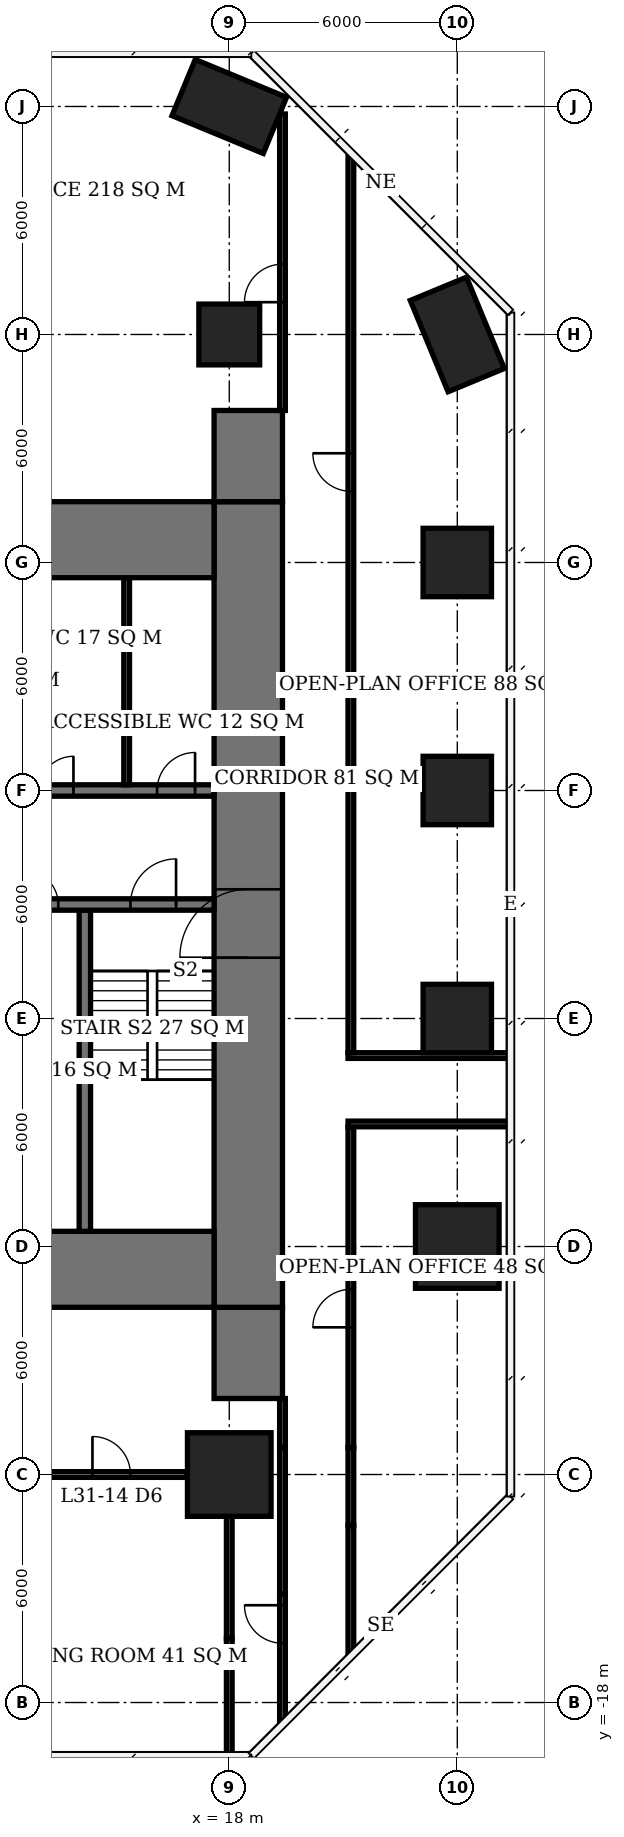
"""IFC4 building model, lengths in metres.
Left out: names, types, materials, properties, quantities, classifications, styles, units other than length and angle.
Written with IfcOpenShell. Run it as: python <this file> out.ifc"""

import sys

from ifc_helpers import new_model, si_unit, direction, frame, frame_2d, origin, origin_2d, place, context, subcontext, project, spatial, rectangle, extrude, element, fill, save


model = new_model("IFC4")
c1 = context("Model", 3, precision=1e-05, world=origin(), true_north=direction((0.0, 1.0)))
c2 = subcontext(c1, "Body", "Model", "MODEL_VIEW")
j1 = project(units=[si_unit("LENGTHUNIT", "METRE"), si_unit("PLANEANGLEUNIT", "RADIAN")], contexts=[c1])
p1 = place(None, origin())
s1 = spatial("IfcSite", under=j1, at=p1, CompositionType="ELEMENT")
p2 = place(p1, origin())
s2 = spatial("IfcBuilding", under=s1, at=p2, CompositionType="ELEMENT")
p3 = place(p2, frame((0.0, 0.0, 128.9)))
s3 = spatial("IfcBuildingStorey", under=s2, at=p3, CompositionType="ELEMENT", Elevation=128.9)
p4 = place(p3, frame((18.0, -12.0, 0.0), z_axis=(0.0, 0.0, 1.0), x_axis=(1.0, 0.0, 0.0)))
e1 = element("IfcColumn", 1, at=p4, inside=s3, PredefinedType="COLUMN", context=c2, shape_type="SweptSolid", body=[
    extrude(rectangle(XDim=2.2, YDim=2.2, at=origin_2d()), origin(), (0.0, 0.0, 1.0), 3.9),
])
p5 = place(p3, frame((18.0, 18.0, 0.0), z_axis=(0.0, 0.0, 1.0), x_axis=(1.0, 0.0, 0.0)))
e2 = element("IfcColumn", 2, at=p5, inside=s3, PredefinedType="COLUMN", context=c2, shape_type="SweptSolid", body=[
    extrude(rectangle(XDim=1.6, YDim=1.6, at=origin_2d()), origin(), (0.0, 0.0, 1.0), 3.9),
])
p6 = place(p3, frame((18.0, 24.0, 0.0), z_axis=(0.0, 0.0, 1.0), x_axis=(0.923879532511, -0.382683432365, 0.0)))
e3 = element("IfcColumn", 3, at=p6, inside=s3, PredefinedType="COLUMN", context=c2, shape_type="SweptSolid", body=[
    extrude(rectangle(XDim=2.6, YDim=1.6, at=origin_2d()), origin(), (0.0, 0.0, 1.0), 3.9),
])
p7 = place(p3, frame((24.0, -6.0, 0.0), z_axis=(0.0, 0.0, 1.0), x_axis=(1.0, 0.0, 0.0)))
e4 = element("IfcColumn", 4, at=p7, inside=s3, PredefinedType="COLUMN", context=c2, shape_type="SweptSolid", body=[
    extrude(rectangle(XDim=2.2, YDim=2.2, at=origin_2d()), origin(), (0.0, 0.0, 1.0), 3.9),
])
for number, where, z_axis, x_axis in (
    (5, (24.0, 0.0, 0.0), (0.0, 0.0, 1.0), (1.0, 0.0, 0.0)),
    (6, (24.0, 6.0, 0.0), (0.0, 0.0, 1.0), (1.0, 0.0, 0.0)),
    (7, (24.0, 12.0, 0.0), (0.0, 0.0, 1.0), (1.0, 0.0, 0.0)),
):
    element("IfcColumn", number, at=place(p3, frame(where, z_axis=z_axis, x_axis=x_axis)), inside=s3, PredefinedType="COLUMN", context=c2, shape_type="SweptSolid", body=[
        extrude(rectangle(XDim=1.8, YDim=1.8, at=origin_2d()), origin(), (0.0, 0.0, 1.0), 3.9),
    ])
p8 = place(p3, frame((24.0, 18.0, 0.0), z_axis=(0.0, 0.0, 1.0), x_axis=(0.382683432365, -0.923879532511, 0.0)))
e8 = element("IfcColumn", 8, at=p8, inside=s3, PredefinedType="COLUMN", context=c2, shape_type="SweptSolid", body=[
    extrude(rectangle(XDim=2.6, YDim=1.6, at=origin_2d()), origin(), (0.0, 0.0, 1.0), 3.9),
])
for number, where, z_axis, x_axis in (
    (9, (-5.6, -6.6, 0.0), (0.0, 0.0, 1.0), (1.0, 0.0, 0.0)),
    (10, (-5.6, 12.6, 0.0), (0.0, 0.0, 1.0), (1.0, 0.0, 0.0)),
):
    element("IfcWall", number, at=place(p3, frame(where, z_axis=z_axis, x_axis=x_axis)), inside=s3, PredefinedType="SHEAR", context=c2, shape_type="SweptSolid", body=[
        extrude(rectangle(XDim=23.2, YDim=2.0, at=frame_2d((11.6, 0.0))), origin(), (0.0, 0.0, 1.0), 3.9),
    ])
p9 = place(p3, frame((18.5, -7.6, 0.0), z_axis=(0.0, 0.0, 1.0), x_axis=(0.0, 1.0, 0.0)))
e11 = element("IfcWall", 11, at=p9, inside=s3, PredefinedType="SHEAR", context=c2, shape_type="SweptSolid", body=[
    extrude(rectangle(XDim=21.2, YDim=1.8, at=frame_2d((10.6, 0.0))), origin(), (0.0, 0.0, 1.0), 3.9),
])
p10 = place(p9, frame((9.2, 0.0, 0.0)))
e12 = element("IfcOpeningElement", 12, at=p10, cuts=e11, PredefinedType="OPENING", context=c2, shape_type="SweptSolid", body=[
    extrude(rectangle(XDim=1.8, YDim=2.4, at=frame_2d((0.9, 1.2))), frame((0.0, 0.91, 0.0), z_axis=(0.0, -1.0, 0.0), x_axis=(1.0, 0.0, 0.0)), (0.0, 0.0, 1.0), 1.82),
])
for number, where, z_axis, x_axis in (
    (13, (18.5, -10.0, 0.0), (0.0, 0.0, 1.0), (0.0, 1.0, 0.0)),
    (14, (18.5, 13.6, 0.0), (0.0, 0.0, 1.0), (0.0, 1.0, 0.0)),
):
    element("IfcWall", number, at=place(p3, frame(where, z_axis=z_axis, x_axis=x_axis)), inside=s3, PredefinedType="SHEAR", context=c2, shape_type="SweptSolid", body=[
        extrude(rectangle(XDim=2.4, YDim=1.8, at=frame_2d((1.2, 0.0))), origin(), (0.0, 0.0, 1.0), 3.9),
    ])
p11 = place(p3, frame((12.15, 3.0, 0.0), z_axis=(0.0, 0.0, 1.0), x_axis=(1.0, 0.0, 0.0)))
e15 = element("IfcWall", 15, at=p11, inside=s3, PredefinedType="SHEAR", context=c2, shape_type="SweptSolid", body=[
    extrude(rectangle(XDim=5.45, YDim=0.3, at=frame_2d((2.725, 0.0))), origin(), (0.0, 0.0, 1.0), 3.9),
])
p12 = place(p11, frame((3.25, 0.0, 0.0)))
e16 = element("IfcOpeningElement", 16, at=p12, cuts=e15, PredefinedType="OPENING", context=c2, shape_type="SweptSolid", body=[
    extrude(rectangle(XDim=1.2, YDim=2.1, at=frame_2d((0.6, 1.05))), frame((0.0, 0.16, 0.0), z_axis=(0.0, -1.0, 0.0), x_axis=(1.0, 0.0, 0.0)), (0.0, 0.0, 1.0), 0.32),
])
p13 = place(p11, frame((0.45, 0.0, 0.0)))
e17 = element("IfcOpeningElement", 17, at=p13, cuts=e15, PredefinedType="OPENING", context=c2, shape_type="SweptSolid", body=[
    extrude(rectangle(XDim=0.9, YDim=2.1, at=frame_2d((0.45, 1.05))), frame((0.0, 0.16, 0.0), z_axis=(0.0, -1.0, 0.0), x_axis=(1.0, 0.0, 0.0)), (0.0, 0.0, 1.0), 0.32),
])
p14 = place(p3, frame((-0.15, 6.0, 0.0), z_axis=(0.0, 0.0, 1.0), x_axis=(1.0, 0.0, 0.0)))
e18 = element("IfcWall", 18, at=p14, inside=s3, PredefinedType="SHEAR", context=c2, shape_type="SweptSolid", body=[
    extrude(rectangle(XDim=17.75, YDim=0.3, at=frame_2d((8.875, 0.0))), origin(), (0.0, 0.0, 1.0), 3.9),
])
p15 = place(p14, frame((13.15, 0.0, 0.0)))
e19 = element("IfcOpeningElement", 19, at=p15, cuts=e18, PredefinedType="OPENING", context=c2, shape_type="SweptSolid", body=[
    extrude(rectangle(XDim=0.9, YDim=2.1, at=frame_2d((0.45, 1.05))), frame((0.0, 0.16, 0.0), z_axis=(0.0, -1.0, 0.0), x_axis=(1.0, 0.0, 0.0)), (0.0, 0.0, 1.0), 0.32),
])
p16 = place(p14, frame((16.25, 0.0, 0.0)))
e20 = element("IfcOpeningElement", 20, at=p16, cuts=e18, PredefinedType="OPENING", context=c2, shape_type="SweptSolid", body=[
    extrude(rectangle(XDim=1.0, YDim=2.1, at=frame_2d((0.5, 1.05))), frame((0.0, 0.16, 0.0), z_axis=(0.0, -1.0, 0.0), x_axis=(1.0, 0.0, 0.0)), (0.0, 0.0, 1.0), 0.32),
])
p17 = place(p14, frame((7.25, 0.0, 0.0)))
e21 = element("IfcOpeningElement", 21, at=p17, cuts=e18, PredefinedType="OPENING", context=c2, shape_type="SweptSolid", body=[
    extrude(rectangle(XDim=1.0, YDim=2.1, at=frame_2d((0.5, 1.05))), frame((0.0, 0.16, 0.0), z_axis=(0.0, -1.0, 0.0), x_axis=(1.0, 0.0, 0.0)), (0.0, 0.0, 1.0), 0.32),
])
p18 = place(p14, frame((1.1, 0.0, 0.0)))
e22 = element("IfcOpeningElement", 22, at=p18, cuts=e18, PredefinedType="OPENING", context=c2, shape_type="SweptSolid", body=[
    extrude(rectangle(XDim=1.1, YDim=2.1, at=frame_2d((0.55, 1.05))), frame((0.0, 0.16, 0.0), z_axis=(0.0, -1.0, 0.0), x_axis=(1.0, 0.0, 0.0)), (0.0, 0.0, 1.0), 0.32),
])
p19 = place(p14, frame((4.1, 0.0, 0.0)))
e23 = element("IfcOpeningElement", 23, at=p19, cuts=e18, PredefinedType="OPENING", context=c2, shape_type="SweptSolid", body=[
    extrude(rectangle(XDim=1.1, YDim=2.1, at=frame_2d((0.55, 1.05))), frame((0.0, 0.16, 0.0), z_axis=(0.0, -1.0, 0.0), x_axis=(1.0, 0.0, 0.0)), (0.0, 0.0, 1.0), 0.32),
])
p20 = place(p3, frame((14.2, -5.6, 0.0), z_axis=(0.0, 0.0, 1.0), x_axis=(0.0, 1.0, 0.0)))
e24 = element("IfcWall", 24, at=p20, inside=s3, PredefinedType="SHEAR", context=c2, shape_type="SweptSolid", body=[
    extrude(rectangle(XDim=8.45, YDim=0.3, at=frame_2d((4.225, 0.0))), origin(), (0.0, 0.0, 1.0), 3.9),
])
p21 = place(p3, frame((15.3, 6.15, 0.0), z_axis=(0.0, 0.0, 1.0), x_axis=(0.0, 1.0, 0.0)))
e25 = element("IfcWall", 25, at=p21, inside=s3, PredefinedType="PLUMBINGWALL", context=c2, shape_type="SweptSolid", body=[
    extrude(rectangle(XDim=5.45, YDim=0.15, at=frame_2d((2.725, 0.0))), origin(), (0.0, 0.0, 1.0), 3.65),
])
p22 = place(p3, frame((12.9, -12.0, 0.0), z_axis=(0.0, 0.0, 1.0), x_axis=(1.0, 0.0, 0.0)))
e26 = element("IfcWall", 26, at=p22, inside=s3, PredefinedType="PARTITIONING", context=c2, shape_type="SweptSolid", body=[
    extrude(rectangle(XDim=4.0, YDim=0.15, at=frame_2d((2.0, 0.0))), origin(), (0.0, 0.0, 1.0), 3.65),
])
p23 = place(p22, frame((1.5, 0.0, 0.0)))
e27 = element("IfcOpeningElement", 27, at=p23, cuts=e26, PredefinedType="OPENING", context=c2, shape_type="SweptSolid", body=[
    extrude(rectangle(XDim=1.0, YDim=2.1, at=frame_2d((0.5, 1.05))), frame((0.0, 0.085, 0.0), z_axis=(0.0, -1.0, 0.0), x_axis=(1.0, 0.0, 0.0)), (0.0, 0.0, 1.0), 0.17),
])
p24 = place(p3, frame((18.0, -19.4, 0.0), z_axis=(0.0, 0.0, 1.0), x_axis=(0.0, 1.0, 0.0)))
e28 = element("IfcWall", 28, at=p24, inside=s3, PredefinedType="PARTITIONING", context=c2, shape_type="SweptSolid", body=[
    extrude(rectangle(XDim=3.09, YDim=0.15, at=frame_2d((1.545, 0.0))), origin(), (0.0, 0.0, 1.0), 3.65),
])
p25 = place(p3, frame((18.0, -16.31, 0.0), z_axis=(0.0, 0.0, 1.0), x_axis=(0.0, 1.0, 0.0)))
e29 = element("IfcWall", 29, at=p25, inside=s3, PredefinedType="PARTITIONING", context=c2, shape_type="SweptSolid", body=[
    extrude(rectangle(XDim=3.21, YDim=0.15, at=frame_2d((1.605, 0.0))), origin(), (0.0, 0.0, 1.0), 2.65),
])
p26 = place(p3, frame((19.4, -18.489, 0.0), z_axis=(0.0, 0.0, 1.0), x_axis=(0.0, 1.0, 0.0)))
e30 = element("IfcWall", 30, at=p26, inside=s3, PredefinedType="PARTITIONING", context=c2, shape_type="SweptSolid", body=[
    extrude(rectangle(XDim=3.349, YDim=0.15, at=frame_2d((1.675, 0.0))), origin(), (0.0, 0.0, 1.0), 3.65),
])
p27 = place(p26, frame((2.049, 0.0, 0.0)))
e31 = element("IfcOpeningElement", 31, at=p27, cuts=e30, PredefinedType="OPENING", context=c2, shape_type="SweptSolid", body=[
    extrude(rectangle(XDim=1.0, YDim=2.1, at=frame_2d((0.5, 1.05))), frame((0.0, 0.085, 0.0), z_axis=(0.0, -1.0, 0.0), x_axis=(1.0, 0.0, 0.0)), (0.0, 0.0, 1.0), 0.17),
])
p28 = place(p3, frame((19.4, -15.14, 0.0), z_axis=(0.0, 0.0, 1.0), x_axis=(0.0, 1.0, 0.0)))
e32 = element("IfcWall", 32, at=p28, inside=s3, PredefinedType="PARTITIONING", context=c2, shape_type="SweptSolid", body=[
    extrude(rectangle(XDim=3.85, YDim=0.15, at=frame_2d((1.925, 0.0))), origin(), (0.0, 0.0, 1.0), 2.65),
])
p29 = place(p3, frame((19.4, -11.29, 0.0), z_axis=(0.0, 0.0, 1.0), x_axis=(0.0, 1.0, 0.0)))
e33 = element("IfcWall", 33, at=p29, inside=s3, PredefinedType="PARTITIONING", context=c2, shape_type="SweptSolid", body=[
    extrude(rectangle(XDim=1.29, YDim=0.15, at=frame_2d((0.645, 0.0))), origin(), (0.0, 0.0, 1.0), 3.65),
])
p30 = place(p3, frame((19.4, 16.0, 0.0), z_axis=(0.0, 0.0, 1.0), x_axis=(0.0, 1.0, 0.0)))
e34 = element("IfcWall", 34, at=p30, inside=s3, PredefinedType="PARTITIONING", context=c2, shape_type="SweptSolid", body=[
    extrude(rectangle(XDim=7.802, YDim=0.15, at=frame_2d((3.901, 0.0))), origin(), (0.0, 0.0, 1.0), 3.65),
])
p31 = place(p30, frame((2.85, 0.0, 0.0)))
e35 = element("IfcOpeningElement", 35, at=p31, cuts=e34, PredefinedType="OPENING", context=c2, shape_type="SweptSolid", body=[
    extrude(rectangle(XDim=1.0, YDim=2.1, at=frame_2d((0.5, 1.05))), frame((0.0, 0.085, 0.0), z_axis=(0.0, -1.0, 0.0), x_axis=(1.0, 0.0, 0.0)), (0.0, 0.0, 1.0), 0.17),
])
p32 = place(p3, frame((21.2, -16.689, 0.0), z_axis=(0.0, 0.0, 1.0), x_axis=(0.0, 1.0, 0.0)))
e36 = element("IfcWall", 36, at=p32, inside=s3, PredefinedType="PARTITIONING", context=c2, shape_type="SweptSolid", body=[
    extrude(rectangle(XDim=3.349, YDim=0.15, at=frame_2d((1.674, 0.0))), origin(), (0.0, 0.0, 1.0), 3.65),
])
p33 = place(p3, frame((21.2, -13.34, 0.0), z_axis=(0.0, 0.0, 1.0), x_axis=(0.0, 1.0, 0.0)))
e37 = element("IfcWall", 37, at=p33, inside=s3, PredefinedType="PARTITIONING", context=c2, shape_type="SweptSolid", body=[
    extrude(rectangle(XDim=2.05, YDim=0.15, at=frame_2d((1.025, 0.0))), origin(), (0.0, 0.0, 1.0), 2.65),
])
p34 = place(p3, frame((21.2, -11.29, 0.0), z_axis=(0.0, 0.0, 1.0), x_axis=(0.0, 1.0, 0.0)))
e38 = element("IfcWall", 38, at=p34, inside=s3, PredefinedType="PARTITIONING", context=c2, shape_type="SweptSolid", body=[
    extrude(rectangle(XDim=8.44, YDim=0.15, at=frame_2d((4.22, 0.0))), origin(), (0.0, 0.0, 1.0), 3.65),
])
p35 = place(p34, frame((3.163, 0.0, 0.0)))
e39 = element("IfcOpeningElement", 39, at=p35, cuts=e38, PredefinedType="OPENING", context=c2, shape_type="SweptSolid", body=[
    extrude(rectangle(XDim=1.0, YDim=2.1, at=frame_2d((0.5, 1.05))), frame((0.0, 0.085, 0.0), z_axis=(0.0, -1.0, 0.0), x_axis=(1.0, 0.0, 0.0)), (0.0, 0.0, 1.0), 0.17),
])
p36 = place(p3, frame((21.125, -2.775, 0.0), z_axis=(0.0, 0.0, 1.0), x_axis=(1.0, 0.0, 0.0)))
e40 = element("IfcWall", 40, at=p36, inside=s3, PredefinedType="PARTITIONING", context=c2, shape_type="SweptSolid", body=[
    extrude(rectangle(XDim=4.275, YDim=0.15, at=frame_2d((2.137, 0.0))), origin(), (0.0, 0.0, 1.0), 3.65),
])
p37 = place(p3, frame((21.2, -0.9, 0.0), z_axis=(0.0, 0.0, 1.0), x_axis=(0.0, 1.0, 0.0)))
e41 = element("IfcWall", 41, at=p37, inside=s3, PredefinedType="PARTITIONING", context=c2, shape_type="SweptSolid", body=[
    extrude(rectangle(XDim=23.589, YDim=0.15, at=frame_2d((11.794, 0.0))), origin(), (0.0, 0.0, 1.0), 3.65),
])
p38 = place(p37, frame((14.774, 0.0, 0.0)))
e42 = element("IfcOpeningElement", 42, at=p38, cuts=e41, PredefinedType="OPENING", context=c2, shape_type="SweptSolid", body=[
    extrude(rectangle(XDim=1.0, YDim=2.1, at=frame_2d((0.5, 1.05))), frame((0.0, 0.085, 0.0), z_axis=(0.0, -1.0, 0.0), x_axis=(1.0, 0.0, 0.0)), (0.0, 0.0, 1.0), 0.17),
])
p39 = place(p3, frame((21.125, -0.975, 0.0), z_axis=(0.0, 0.0, 1.0), x_axis=(1.0, 0.0, 0.0)))
e43 = element("IfcWall", 43, at=p39, inside=s3, PredefinedType="PARTITIONING", context=c2, shape_type="SweptSolid", body=[
    extrude(rectangle(XDim=4.275, YDim=0.15, at=frame_2d((2.137, 0.0))), origin(), (0.0, 0.0, 1.0), 3.65),
])
p40 = place(p10, origin())
e44 = element("IfcDoor", 44, at=p40, inside=s3, OperationType="DOUBLE_DOOR_SINGLE_SWING", PredefinedType="DOOR", context=c2, shape_type="SweptSolid", body=[
    extrude(rectangle(XDim=1.8, YDim=2.4, at=frame_2d((0.9, 1.2))), frame((0.0, 0.025, 0.0), z_axis=(0.0, -1.0, 0.0), x_axis=(1.0, 0.0, 0.0)), (0.0, 0.0, 1.0), 0.05),
])
fill(e12, e44)
p41 = place(p12, origin())
e45 = element("IfcDoor", 45, at=p41, inside=s3, OperationType="SINGLE_SWING_RIGHT", PredefinedType="DOOR", context=c2, shape_type="SweptSolid", body=[
    extrude(rectangle(XDim=1.2, YDim=2.1, at=frame_2d((0.6, 1.05))), frame((0.0, 0.025, 0.0), z_axis=(0.0, -1.0, 0.0), x_axis=(1.0, 0.0, 0.0)), (0.0, 0.0, 1.0), 0.05),
])
fill(e16, e45)
p42 = place(p13, origin())
e46 = element("IfcDoor", 46, at=p42, inside=s3, OperationType="SINGLE_SWING_LEFT", PredefinedType="DOOR", context=c2, shape_type="SweptSolid", body=[
    extrude(rectangle(XDim=0.9, YDim=2.1, at=frame_2d((0.45, 1.05))), frame((0.0, 0.025, 0.0), z_axis=(0.0, -1.0, 0.0), x_axis=(1.0, 0.0, 0.0)), (0.0, 0.0, 1.0), 0.05),
])
fill(e17, e46)
p43 = place(p15, origin())
e47 = element("IfcDoor", 47, at=p43, inside=s3, OperationType="SINGLE_SWING_RIGHT", PredefinedType="DOOR", context=c2, shape_type="SweptSolid", body=[
    extrude(rectangle(XDim=0.9, YDim=2.1, at=frame_2d((0.45, 1.05))), frame((0.0, 0.025, 0.0), z_axis=(0.0, -1.0, 0.0), x_axis=(1.0, 0.0, 0.0)), (0.0, 0.0, 1.0), 0.05),
])
fill(e19, e47)
p44 = place(p16, origin())
e48 = element("IfcDoor", 48, at=p44, inside=s3, OperationType="SINGLE_SWING_RIGHT", PredefinedType="DOOR", context=c2, shape_type="SweptSolid", body=[
    extrude(rectangle(XDim=1.0, YDim=2.1, at=frame_2d((0.5, 1.05))), frame((0.0, 0.025, 0.0), z_axis=(0.0, -1.0, 0.0), x_axis=(1.0, 0.0, 0.0)), (0.0, 0.0, 1.0), 0.05),
])
fill(e20, e48)
p45 = place(p23, origin())
e49 = element("IfcDoor", 49, at=p45, inside=s3, OperationType="SINGLE_SWING_LEFT", PredefinedType="DOOR", context=c2, shape_type="SweptSolid", body=[
    extrude(rectangle(XDim=1.0, YDim=2.1, at=frame_2d((0.5, 1.05))), frame((0.0, 0.025, 0.0), z_axis=(0.0, -1.0, 0.0), x_axis=(1.0, 0.0, 0.0)), (0.0, 0.0, 1.0), 0.05),
])
fill(e27, e49)
p46 = place(p27, origin())
e50 = element("IfcDoor", 50, at=p46, inside=s3, OperationType="SINGLE_SWING_RIGHT", PredefinedType="DOOR", context=c2, shape_type="SweptSolid", body=[
    extrude(rectangle(XDim=1.0, YDim=2.1, at=frame_2d((0.5, 1.05))), frame((0.0, 0.025, 0.0), z_axis=(0.0, -1.0, 0.0), x_axis=(1.0, 0.0, 0.0)), (0.0, 0.0, 1.0), 0.05),
])
fill(e31, e50)
p47 = place(p35, origin())
e51 = element("IfcDoor", 51, at=p47, inside=s3, OperationType="SINGLE_SWING_LEFT", PredefinedType="DOOR", context=c2, shape_type="SweptSolid", body=[
    extrude(rectangle(XDim=1.0, YDim=2.1, at=frame_2d((0.5, 1.05))), frame((0.0, 0.025, 0.0), z_axis=(0.0, -1.0, 0.0), x_axis=(1.0, 0.0, 0.0)), (0.0, 0.0, 1.0), 0.05),
])
fill(e39, e51)
p48 = place(p38, origin())
e52 = element("IfcDoor", 52, at=p48, inside=s3, OperationType="SINGLE_SWING_RIGHT", PredefinedType="DOOR", context=c2, shape_type="SweptSolid", body=[
    extrude(rectangle(XDim=1.0, YDim=2.1, at=frame_2d((0.5, 1.05))), frame((0.0, 0.025, 0.0), z_axis=(0.0, -1.0, 0.0), x_axis=(1.0, 0.0, 0.0)), (0.0, 0.0, 1.0), 0.05),
])
fill(e42, e52)
p49 = place(p31, origin())
e53 = element("IfcDoor", 53, at=p49, inside=s3, OperationType="SINGLE_SWING_LEFT", PredefinedType="DOOR", context=c2, shape_type="SweptSolid", body=[
    extrude(rectangle(XDim=1.0, YDim=2.1, at=frame_2d((0.5, 1.05))), frame((0.0, 0.025, 0.0), z_axis=(0.0, -1.0, 0.0), x_axis=(1.0, 0.0, 0.0)), (0.0, 0.0, 1.0), 0.05),
])
fill(e35, e53)
save(model, sys.argv[1])
